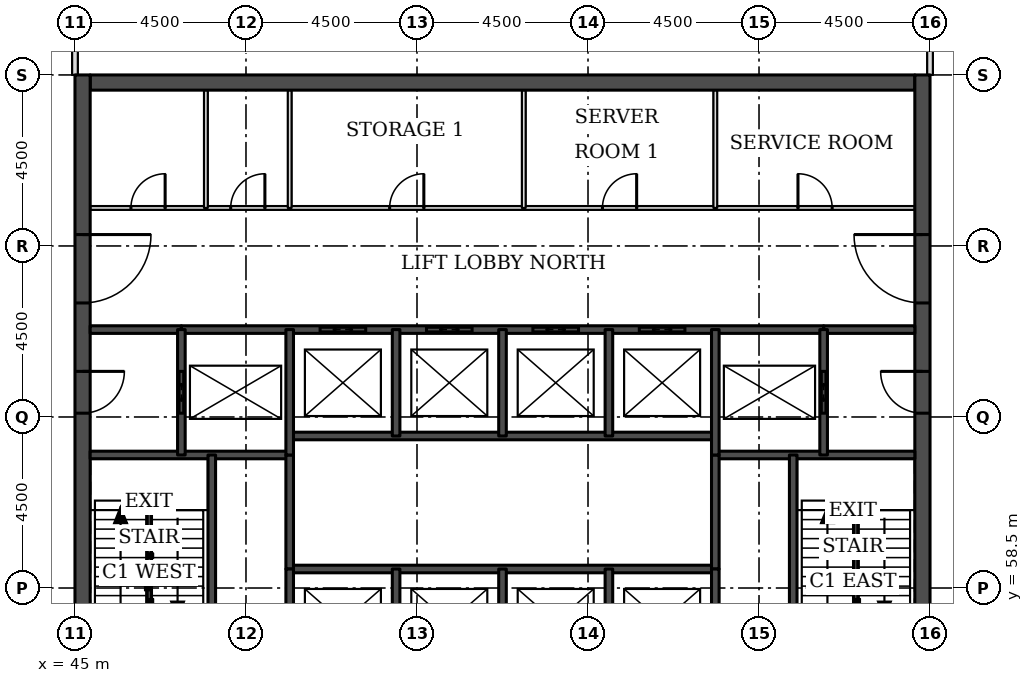
"""IFC4 building model, lengths in metres.
Left out: names, types, materials, properties, quantities, classifications, styles, units other than length and angle.
Written with IfcOpenShell. Run it as: python <this file> out.ifc"""

import sys

from ifc_helpers import new_model, si_unit, direction, frame, frame_2d, origin, place, context, subcontext, project, spatial, rectangle, extrude, element, fill, save


model = new_model("IFC4")
c1 = context("Model", 3, precision=1e-05, world=origin(), true_north=direction((0.0, 1.0)))
c2 = subcontext(c1, "Body", "Model", "MODEL_VIEW")
j1 = project(units=[si_unit("LENGTHUNIT", "METRE"), si_unit("PLANEANGLEUNIT", "RADIAN")], contexts=[c1])
p1 = place(None, origin())
s1 = spatial("IfcSite", under=j1, at=p1, CompositionType="ELEMENT")
p2 = place(p1, origin())
s2 = spatial("IfcBuilding", under=s1, at=p2, CompositionType="ELEMENT")
p3 = place(p2, frame((0.0, 0.0, 147.7)))
s3 = spatial("IfcBuildingStorey", under=s2, at=p3, CompositionType="ELEMENT", Elevation=147.7)
p4 = place(p3, frame((45.4, 71.8, 0.0), z_axis=(0.0, 0.0, 1.0), x_axis=(1.0, 0.0, 0.0)))
e1 = element("IfcWall", 1, at=p4, inside=s3, PredefinedType="SHEAR", context=c2, shape_type="SweptSolid", body=[
    extrude(rectangle(XDim=21.7, YDim=0.4, at=frame_2d((10.85, 0.0))), origin(), (0.0, 0.0, 1.0), 3.7),
])
p5 = place(p3, frame((45.2, 49.5, 0.0), z_axis=(0.0, 0.0, 1.0), x_axis=(0.0, 1.0, 0.0)))
e2 = element("IfcWall", 2, at=p5, inside=s3, PredefinedType="SHEAR", context=c2, shape_type="SweptSolid", body=[
    extrude(rectangle(XDim=22.5, YDim=0.4, at=frame_2d((11.25, 0.0))), origin(), (0.0, 0.0, 1.0), 3.7),
])
p6 = place(p5, frame((4.2, 0.0, 0.0)))
e3 = element("IfcOpeningElement", 3, at=p6, cuts=e2, PredefinedType="OPENING", context=c2, shape_type="SweptSolid", body=[
    extrude(rectangle(XDim=1.8, YDim=2.1, at=frame_2d((0.9, 1.05))), frame((0.0, 0.21, 0.0), z_axis=(0.0, -1.0, 0.0), x_axis=(1.0, 0.0, 0.0)), (0.0, 0.0, 1.0), 0.42),
])
p7 = place(p5, frame((6.9, 0.0, 0.0)))
e4 = element("IfcOpeningElement", 4, at=p7, cuts=e2, PredefinedType="OPENING", context=c2, shape_type="SweptSolid", body=[
    extrude(rectangle(XDim=1.1, YDim=2.1, at=frame_2d((0.55, 1.05))), frame((0.0, 0.21, 0.0), z_axis=(0.0, -1.0, 0.0), x_axis=(1.0, 0.0, 0.0)), (0.0, 0.0, 1.0), 0.42),
])
p8 = place(p5, frame((13.6, 0.0, 0.0)))
e5 = element("IfcOpeningElement", 5, at=p8, cuts=e2, PredefinedType="OPENING", context=c2, shape_type="SweptSolid", body=[
    extrude(rectangle(XDim=1.1, YDim=2.1, at=frame_2d((0.55, 1.05))), frame((0.0, 0.21, 0.0), z_axis=(0.0, -1.0, 0.0), x_axis=(1.0, 0.0, 0.0)), (0.0, 0.0, 1.0), 0.42),
])
p9 = place(p5, frame((16.5, 0.0, 0.0)))
e6 = element("IfcOpeningElement", 6, at=p9, cuts=e2, PredefinedType="OPENING", context=c2, shape_type="SweptSolid", body=[
    extrude(rectangle(XDim=1.8, YDim=2.1, at=frame_2d((0.9, 1.05))), frame((0.0, 0.21, 0.0), z_axis=(0.0, -1.0, 0.0), x_axis=(1.0, 0.0, 0.0)), (0.0, 0.0, 1.0), 0.42),
])
p10 = place(p3, frame((67.3, 49.5, 0.0), z_axis=(0.0, 0.0, 1.0), x_axis=(0.0, 1.0, 0.0)))
e7 = element("IfcWall", 7, at=p10, inside=s3, PredefinedType="SHEAR", context=c2, shape_type="SweptSolid", body=[
    extrude(rectangle(XDim=22.5, YDim=0.4, at=frame_2d((11.25, 0.0))), origin(), (0.0, 0.0, 1.0), 3.7),
])
p11 = place(p10, frame((4.2, 0.0, 0.0)))
e8 = element("IfcOpeningElement", 8, at=p11, cuts=e7, PredefinedType="OPENING", context=c2, shape_type="SweptSolid", body=[
    extrude(rectangle(XDim=1.8, YDim=2.1, at=frame_2d((0.9, 1.05))), frame((0.0, 0.21, 0.0), z_axis=(0.0, -1.0, 0.0), x_axis=(1.0, 0.0, 0.0)), (0.0, 0.0, 1.0), 0.42),
])
p12 = place(p10, frame((6.9, 0.0, 0.0)))
e9 = element("IfcOpeningElement", 9, at=p12, cuts=e7, PredefinedType="OPENING", context=c2, shape_type="SweptSolid", body=[
    extrude(rectangle(XDim=1.1, YDim=2.1, at=frame_2d((0.55, 1.05))), frame((0.0, 0.21, 0.0), z_axis=(0.0, -1.0, 0.0), x_axis=(1.0, 0.0, 0.0)), (0.0, 0.0, 1.0), 0.42),
])
p13 = place(p10, frame((13.6, 0.0, 0.0)))
e10 = element("IfcOpeningElement", 10, at=p13, cuts=e7, PredefinedType="OPENING", context=c2, shape_type="SweptSolid", body=[
    extrude(rectangle(XDim=1.1, YDim=2.1, at=frame_2d((0.55, 1.05))), frame((0.0, 0.21, 0.0), z_axis=(0.0, -1.0, 0.0), x_axis=(1.0, 0.0, 0.0)), (0.0, 0.0, 1.0), 0.42),
])
p14 = place(p10, frame((16.5, 0.0, 0.0)))
e11 = element("IfcOpeningElement", 11, at=p14, cuts=e7, PredefinedType="OPENING", context=c2, shape_type="SweptSolid", body=[
    extrude(rectangle(XDim=1.8, YDim=2.1, at=frame_2d((0.9, 1.05))), frame((0.0, 0.21, 0.0), z_axis=(0.0, -1.0, 0.0), x_axis=(1.0, 0.0, 0.0)), (0.0, 0.0, 1.0), 0.42),
])
for number, where, z_axis, x_axis in (
    (12, (45.0, 72.0, 0.0), (0.0, 0.0, 1.0), (0.0, 1.0, 0.0)),
    (13, (67.5, 72.0, 0.0), (0.0, 0.0, 1.0), (0.0, 1.0, 0.0)),
):
    element("IfcWall", number, at=place(p3, frame(where, z_axis=z_axis, x_axis=x_axis)), inside=s3, PredefinedType="PARTITIONING", context=c2, shape_type="SweptSolid", body=[
        extrude(rectangle(XDim=3.0, YDim=0.15, at=frame_2d((1.5, 0.0))), origin(), (0.0, 0.0, 1.0), 3.022),
    ])
p15 = place(p3, frame((50.65, 59.0, 0.0), z_axis=(0.0, 0.0, 1.0), x_axis=(1.0, 0.0, 0.0)))
e14 = element("IfcWall", 14, at=p15, inside=s3, PredefinedType="SOLIDWALL", context=c2, shape_type="SweptSolid", body=[
    extrude(rectangle(XDim=11.2, YDim=0.2, at=frame_2d((5.6, 0.0))), origin(), (0.0, 0.0, 1.0), 3.7),
])
for number, where, z_axis, x_axis in (
    (15, (45.4, 62.0, 0.0), (0.0, 0.0, 1.0), (1.0, 0.0, 0.0)),
    (16, (61.85, 62.0, 0.0), (0.0, 0.0, 1.0), (1.0, 0.0, 0.0)),
):
    element("IfcWall", number, at=place(p3, frame(where, z_axis=z_axis, x_axis=x_axis)), inside=s3, PredefinedType="SOLIDWALL", context=c2, shape_type="SweptSolid", body=[
        extrude(rectangle(XDim=5.25, YDim=0.2, at=frame_2d((2.625, 0.0))), origin(), (0.0, 0.0, 1.0), 3.55),
    ])
p16 = place(p3, frame((50.65, 62.5, 0.0), z_axis=(0.0, 0.0, 1.0), x_axis=(1.0, 0.0, 0.0)))
e17 = element("IfcWall", 17, at=p16, inside=s3, PredefinedType="SOLIDWALL", context=c2, shape_type="SweptSolid", body=[
    extrude(rectangle(XDim=11.2, YDim=0.2, at=frame_2d((5.6, 0.0))), origin(), (0.0, 0.0, 1.0), 3.7),
])
for number, where, z_axis, x_axis in (
    (18, (45.4, 65.3, 0.0), (0.0, 0.0, 1.0), (1.0, 0.0, 0.0)),
    (19, (64.7, 65.3, 0.0), (0.0, 0.0, 1.0), (1.0, 0.0, 0.0)),
):
    element("IfcWall", number, at=place(p3, frame(where, z_axis=z_axis, x_axis=x_axis)), inside=s3, PredefinedType="SOLIDWALL", context=c2, shape_type="SweptSolid", body=[
        extrude(rectangle(XDim=2.4, YDim=0.2, at=frame_2d((1.2, 0.0))), origin(), (0.0, 0.0, 1.0), 3.55),
    ])
p17 = place(p3, frame((47.8, 65.3, 0.0), z_axis=(0.0, 0.0, 1.0), x_axis=(1.0, 0.0, 0.0)))
e20 = element("IfcWall", 20, at=p17, inside=s3, PredefinedType="SOLIDWALL", context=c2, shape_type="SweptSolid", body=[
    extrude(rectangle(XDim=16.9, YDim=0.2, at=frame_2d((8.45, 0.0))), origin(), (0.0, 0.0, 1.0), 3.55),
])
p18 = place(p17, frame((3.65, 0.0, 0.0)))
e21 = element("IfcOpeningElement", 21, at=p18, cuts=e20, PredefinedType="OPENING", context=c2, shape_type="SweptSolid", body=[
    extrude(rectangle(XDim=1.2, YDim=2.1, at=frame_2d((0.6, 1.05))), frame((0.0, 0.11, 0.0), z_axis=(0.0, -1.0, 0.0), x_axis=(1.0, 0.0, 0.0)), (0.0, 0.0, 1.0), 0.22),
])
p19 = place(p17, frame((6.45, 0.0, 0.0)))
e22 = element("IfcOpeningElement", 22, at=p19, cuts=e20, PredefinedType="OPENING", context=c2, shape_type="SweptSolid", body=[
    extrude(rectangle(XDim=1.2, YDim=2.1, at=frame_2d((0.6, 1.05))), frame((0.0, 0.11, 0.0), z_axis=(0.0, -1.0, 0.0), x_axis=(1.0, 0.0, 0.0)), (0.0, 0.0, 1.0), 0.22),
])
p20 = place(p17, frame((9.25, 0.0, 0.0)))
e23 = element("IfcOpeningElement", 23, at=p20, cuts=e20, PredefinedType="OPENING", context=c2, shape_type="SweptSolid", body=[
    extrude(rectangle(XDim=1.2, YDim=2.1, at=frame_2d((0.6, 1.05))), frame((0.0, 0.11, 0.0), z_axis=(0.0, -1.0, 0.0), x_axis=(1.0, 0.0, 0.0)), (0.0, 0.0, 1.0), 0.22),
])
p21 = place(p17, frame((12.05, 0.0, 0.0)))
e24 = element("IfcOpeningElement", 24, at=p21, cuts=e20, PredefinedType="OPENING", context=c2, shape_type="SweptSolid", body=[
    extrude(rectangle(XDim=1.2, YDim=2.1, at=frame_2d((0.6, 1.05))), frame((0.0, 0.11, 0.0), z_axis=(0.0, -1.0, 0.0), x_axis=(1.0, 0.0, 0.0)), (0.0, 0.0, 1.0), 0.22),
])
p22 = place(p3, frame((45.4, 68.5, 0.0), z_axis=(0.0, 0.0, 1.0), x_axis=(1.0, 0.0, 0.0)))
e25 = element("IfcWall", 25, at=p22, inside=s3, PredefinedType="PARTITIONING", context=c2, shape_type="SweptSolid", body=[
    extrude(rectangle(XDim=21.7, YDim=0.1, at=frame_2d((10.85, 0.0))), origin(), (0.0, 0.0, 1.0), 3.55),
])
p23 = place(p22, frame((18.625, 0.0, 0.0)))
e26 = element("IfcOpeningElement", 26, at=p23, cuts=e25, PredefinedType="OPENING", context=c2, shape_type="SweptSolid", body=[
    extrude(rectangle(XDim=0.9, YDim=2.1, at=frame_2d((0.45, 1.05))), frame((0.0, 0.06, 0.0), z_axis=(0.0, -1.0, 0.0), x_axis=(1.0, 0.0, 0.0)), (0.0, 0.0, 1.0), 0.12),
])
p24 = place(p22, frame((1.073, 0.0, 0.0)))
e27 = element("IfcOpeningElement", 27, at=p24, cuts=e25, PredefinedType="OPENING", context=c2, shape_type="SweptSolid", body=[
    extrude(rectangle(XDim=0.9, YDim=2.1, at=frame_2d((0.45, 1.05))), frame((0.0, 0.06, 0.0), z_axis=(0.0, -1.0, 0.0), x_axis=(1.0, 0.0, 0.0)), (0.0, 0.0, 1.0), 0.12),
])
p25 = place(p22, frame((3.698, 0.0, 0.0)))
e28 = element("IfcOpeningElement", 28, at=p25, cuts=e25, PredefinedType="OPENING", context=c2, shape_type="SweptSolid", body=[
    extrude(rectangle(XDim=0.9, YDim=2.1, at=frame_2d((0.45, 1.05))), frame((0.0, 0.06, 0.0), z_axis=(0.0, -1.0, 0.0), x_axis=(1.0, 0.0, 0.0)), (0.0, 0.0, 1.0), 0.12),
])
p26 = place(p22, frame((13.48, 0.0, 0.0)))
e29 = element("IfcOpeningElement", 29, at=p26, cuts=e25, PredefinedType="OPENING", context=c2, shape_type="SweptSolid", body=[
    extrude(rectangle(XDim=0.9, YDim=2.1, at=frame_2d((0.45, 1.05))), frame((0.0, 0.06, 0.0), z_axis=(0.0, -1.0, 0.0), x_axis=(1.0, 0.0, 0.0)), (0.0, 0.0, 1.0), 0.12),
])
p27 = place(p22, frame((7.88, 0.0, 0.0)))
e30 = element("IfcOpeningElement", 30, at=p27, cuts=e25, PredefinedType="OPENING", context=c2, shape_type="SweptSolid", body=[
    extrude(rectangle(XDim=0.9, YDim=2.1, at=frame_2d((0.45, 1.05))), frame((0.0, 0.06, 0.0), z_axis=(0.0, -1.0, 0.0), x_axis=(1.0, 0.0, 0.0)), (0.0, 0.0, 1.0), 0.12),
])
p28 = place(p3, frame((47.8, 62.0, 0.0), z_axis=(0.0, 0.0, 1.0), x_axis=(0.0, 1.0, 0.0)))
e31 = element("IfcWall", 31, at=p28, inside=s3, PredefinedType="SOLIDWALL", context=c2, shape_type="SweptSolid", body=[
    extrude(rectangle(XDim=3.3, YDim=0.2, at=frame_2d((1.65, 0.0))), origin(), (0.0, 0.0, 1.0), 3.55),
])
p29 = place(p28, frame((1.1, 0.0, 0.0)))
e32 = element("IfcOpeningElement", 32, at=p29, cuts=e31, PredefinedType="OPENING", context=c2, shape_type="SweptSolid", body=[
    extrude(rectangle(XDim=1.1, YDim=2.1, at=frame_2d((0.55, 1.05))), frame((0.0, 0.11, 0.0), z_axis=(0.0, -1.0, 0.0), x_axis=(1.0, 0.0, 0.0)), (0.0, 0.0, 1.0), 0.22),
])
p30 = place(p3, frame((48.445, 68.5, 0.0), z_axis=(0.0, 0.0, 1.0), x_axis=(0.0, 1.0, 0.0)))
e33 = element("IfcWall", 33, at=p30, inside=s3, PredefinedType="PARTITIONING", context=c2, shape_type="SweptSolid", body=[
    extrude(rectangle(XDim=3.1, YDim=0.1, at=frame_2d((1.55, 0.0))), origin(), (0.0, 0.0, 1.0), 3.55),
])
p31 = place(p3, frame((48.6, 56.2, 0.0), z_axis=(0.0, 0.0, 1.0), x_axis=(0.0, 1.0, 0.0)))
e34 = element("IfcWall", 34, at=p31, inside=s3, PredefinedType="SOLIDWALL", context=c2, shape_type="SweptSolid", body=[
    extrude(rectangle(XDim=5.8, YDim=0.2, at=frame_2d((2.9, 0.0))), origin(), (0.0, 0.0, 1.0), 3.55),
])
p32 = place(p3, frame((50.65, 68.5, 0.0), z_axis=(0.0, 0.0, 1.0), x_axis=(0.0, 1.0, 0.0)))
e35 = element("IfcWall", 35, at=p32, inside=s3, PredefinedType="PARTITIONING", context=c2, shape_type="SweptSolid", body=[
    extrude(rectangle(XDim=3.1, YDim=0.1, at=frame_2d((1.55, 0.0))), origin(), (0.0, 0.0, 1.0), 3.55),
])
p33 = place(p3, frame((50.65, 59.0, 0.0), z_axis=(0.0, 0.0, 1.0), x_axis=(0.0, 1.0, 0.0)))
e36 = element("IfcWall", 36, at=p33, inside=s3, PredefinedType="SOLIDWALL", context=c2, shape_type="SweptSolid", body=[
    extrude(rectangle(XDim=3.0, YDim=0.2, at=frame_2d((1.5, 0.0))), origin(), (0.0, 0.0, 1.0), 3.7),
])
p34 = place(p3, frame((50.65, 56.2, 0.0), z_axis=(0.0, 0.0, 1.0), x_axis=(0.0, 1.0, 0.0)))
e37 = element("IfcWall", 37, at=p34, inside=s3, PredefinedType="SOLIDWALL", context=c2, shape_type="SweptSolid", body=[
    extrude(rectangle(XDim=2.8, YDim=0.2, at=frame_2d((1.4, 0.0))), origin(), (0.0, 0.0, 1.0), 3.55),
])
p35 = place(p3, frame((50.65, 62.0, 0.0), z_axis=(0.0, 0.0, 1.0), x_axis=(0.0, 1.0, 0.0)))
e38 = element("IfcWall", 38, at=p35, inside=s3, PredefinedType="SOLIDWALL", context=c2, shape_type="SweptSolid", body=[
    extrude(rectangle(XDim=3.3, YDim=0.2, at=frame_2d((1.65, 0.0))), origin(), (0.0, 0.0, 1.0), 3.55),
])
for number, where, z_axis, x_axis in (
    (39, (53.45, 56.2, 0.0), (0.0, 0.0, 1.0), (0.0, 1.0, 0.0)),
    (40, (53.45, 62.5, 0.0), (0.0, 0.0, 1.0), (0.0, 1.0, 0.0)),
    (41, (56.25, 56.2, 0.0), (0.0, 0.0, 1.0), (0.0, 1.0, 0.0)),
    (42, (56.25, 62.5, 0.0), (0.0, 0.0, 1.0), (0.0, 1.0, 0.0)),
):
    element("IfcWall", number, at=place(p3, frame(where, z_axis=z_axis, x_axis=x_axis)), inside=s3, PredefinedType="SOLIDWALL", context=c2, shape_type="SweptSolid", body=[
        extrude(rectangle(XDim=2.8, YDim=0.2, at=frame_2d((1.4, 0.0))), origin(), (0.0, 0.0, 1.0), 3.55),
    ])
p36 = place(p3, frame((56.81, 68.5, 0.0), z_axis=(0.0, 0.0, 1.0), x_axis=(0.0, 1.0, 0.0)))
e43 = element("IfcWall", 43, at=p36, inside=s3, PredefinedType="PARTITIONING", context=c2, shape_type="SweptSolid", body=[
    extrude(rectangle(XDim=3.1, YDim=0.1, at=frame_2d((1.55, 0.0))), origin(), (0.0, 0.0, 1.0), 3.55),
])
for number, where, z_axis, x_axis in (
    (44, (59.05, 56.2, 0.0), (0.0, 0.0, 1.0), (0.0, 1.0, 0.0)),
    (45, (59.05, 62.5, 0.0), (0.0, 0.0, 1.0), (0.0, 1.0, 0.0)),
):
    element("IfcWall", number, at=place(p3, frame(where, z_axis=z_axis, x_axis=x_axis)), inside=s3, PredefinedType="SOLIDWALL", context=c2, shape_type="SweptSolid", body=[
        extrude(rectangle(XDim=2.8, YDim=0.2, at=frame_2d((1.4, 0.0))), origin(), (0.0, 0.0, 1.0), 3.55),
    ])
p37 = place(p3, frame((61.85, 68.5, 0.0), z_axis=(0.0, 0.0, 1.0), x_axis=(0.0, 1.0, 0.0)))
e46 = element("IfcWall", 46, at=p37, inside=s3, PredefinedType="PARTITIONING", context=c2, shape_type="SweptSolid", body=[
    extrude(rectangle(XDim=3.1, YDim=0.1, at=frame_2d((1.55, 0.0))), origin(), (0.0, 0.0, 1.0), 3.55),
])
p38 = place(p3, frame((61.85, 59.0, 0.0), z_axis=(0.0, 0.0, 1.0), x_axis=(0.0, 1.0, 0.0)))
e47 = element("IfcWall", 47, at=p38, inside=s3, PredefinedType="SOLIDWALL", context=c2, shape_type="SweptSolid", body=[
    extrude(rectangle(XDim=3.0, YDim=0.2, at=frame_2d((1.5, 0.0))), origin(), (0.0, 0.0, 1.0), 3.7),
])
p39 = place(p3, frame((61.85, 56.2, 0.0), z_axis=(0.0, 0.0, 1.0), x_axis=(0.0, 1.0, 0.0)))
e48 = element("IfcWall", 48, at=p39, inside=s3, PredefinedType="SOLIDWALL", context=c2, shape_type="SweptSolid", body=[
    extrude(rectangle(XDim=2.8, YDim=0.2, at=frame_2d((1.4, 0.0))), origin(), (0.0, 0.0, 1.0), 3.55),
])
p40 = place(p3, frame((61.85, 62.0, 0.0), z_axis=(0.0, 0.0, 1.0), x_axis=(0.0, 1.0, 0.0)))
e49 = element("IfcWall", 49, at=p40, inside=s3, PredefinedType="SOLIDWALL", context=c2, shape_type="SweptSolid", body=[
    extrude(rectangle(XDim=3.3, YDim=0.2, at=frame_2d((1.65, 0.0))), origin(), (0.0, 0.0, 1.0), 3.55),
])
p41 = place(p3, frame((63.9, 56.2, 0.0), z_axis=(0.0, 0.0, 1.0), x_axis=(0.0, 1.0, 0.0)))
e50 = element("IfcWall", 50, at=p41, inside=s3, PredefinedType="SOLIDWALL", context=c2, shape_type="SweptSolid", body=[
    extrude(rectangle(XDim=5.8, YDim=0.2, at=frame_2d((2.9, 0.0))), origin(), (0.0, 0.0, 1.0), 3.55),
])
p42 = place(p3, frame((64.7, 62.0, 0.0), z_axis=(0.0, 0.0, 1.0), x_axis=(0.0, 1.0, 0.0)))
e51 = element("IfcWall", 51, at=p42, inside=s3, PredefinedType="SOLIDWALL", context=c2, shape_type="SweptSolid", body=[
    extrude(rectangle(XDim=3.3, YDim=0.2, at=frame_2d((1.65, 0.0))), origin(), (0.0, 0.0, 1.0), 3.55),
])
p43 = place(p42, frame((1.1, 0.0, 0.0)))
e52 = element("IfcOpeningElement", 52, at=p43, cuts=e51, PredefinedType="OPENING", context=c2, shape_type="SweptSolid", body=[
    extrude(rectangle(XDim=1.1, YDim=2.1, at=frame_2d((0.55, 1.05))), frame((0.0, 0.11, 0.0), z_axis=(0.0, -1.0, 0.0), x_axis=(1.0, 0.0, 0.0)), (0.0, 0.0, 1.0), 0.22),
])
p44 = place(p18, origin())
e53 = element("IfcDoor", 53, at=p44, inside=s3, OperationType="DOUBLE_DOOR_SLIDING", PredefinedType="DOOR", context=c2, shape_type="SweptSolid", body=[
    extrude(rectangle(XDim=1.2, YDim=2.1, at=frame_2d((0.6, 1.05))), frame((0.0, 0.025, 0.0), z_axis=(0.0, -1.0, 0.0), x_axis=(1.0, 0.0, 0.0)), (0.0, 0.0, 1.0), 0.05),
])
fill(e21, e53)
p45 = place(p19, origin())
e54 = element("IfcDoor", 54, at=p45, inside=s3, OperationType="DOUBLE_DOOR_SLIDING", PredefinedType="DOOR", context=c2, shape_type="SweptSolid", body=[
    extrude(rectangle(XDim=1.2, YDim=2.1, at=frame_2d((0.6, 1.05))), frame((0.0, 0.025, 0.0), z_axis=(0.0, -1.0, 0.0), x_axis=(1.0, 0.0, 0.0)), (0.0, 0.0, 1.0), 0.05),
])
fill(e22, e54)
p46 = place(p20, origin())
e55 = element("IfcDoor", 55, at=p46, inside=s3, OperationType="DOUBLE_DOOR_SLIDING", PredefinedType="DOOR", context=c2, shape_type="SweptSolid", body=[
    extrude(rectangle(XDim=1.2, YDim=2.1, at=frame_2d((0.6, 1.05))), frame((0.0, 0.025, 0.0), z_axis=(0.0, -1.0, 0.0), x_axis=(1.0, 0.0, 0.0)), (0.0, 0.0, 1.0), 0.05),
])
fill(e23, e55)
p47 = place(p21, origin())
e56 = element("IfcDoor", 56, at=p47, inside=s3, OperationType="DOUBLE_DOOR_SLIDING", PredefinedType="DOOR", context=c2, shape_type="SweptSolid", body=[
    extrude(rectangle(XDim=1.2, YDim=2.1, at=frame_2d((0.6, 1.05))), frame((0.0, 0.025, 0.0), z_axis=(0.0, -1.0, 0.0), x_axis=(1.0, 0.0, 0.0)), (0.0, 0.0, 1.0), 0.05),
])
fill(e24, e56)
p48 = place(p29, origin())
e57 = element("IfcDoor", 57, at=p48, inside=s3, OperationType="DOUBLE_DOOR_SLIDING", PredefinedType="DOOR", context=c2, shape_type="SweptSolid", body=[
    extrude(rectangle(XDim=1.1, YDim=2.1, at=frame_2d((0.55, 1.05))), frame((0.0, 0.025, 0.0), z_axis=(0.0, -1.0, 0.0), x_axis=(1.0, 0.0, 0.0)), (0.0, 0.0, 1.0), 0.05),
])
fill(e32, e57)
p49 = place(p43, origin())
e58 = element("IfcDoor", 58, at=p49, inside=s3, OperationType="DOUBLE_DOOR_SLIDING", PredefinedType="DOOR", context=c2, shape_type="SweptSolid", body=[
    extrude(rectangle(XDim=1.1, YDim=2.1, at=frame_2d((0.55, 1.05))), frame((0.0, 0.025, 0.0), z_axis=(0.0, -1.0, 0.0), x_axis=(1.0, 0.0, 0.0)), (0.0, 0.0, 1.0), 0.05),
])
fill(e52, e58)
p50 = place(p8, frame((1.1, 0.0, 0.0), z_axis=(0.0, 0.0, 1.0), x_axis=(-1.0, 0.0, 0.0)))
e59 = element("IfcDoor", 59, at=p50, inside=s3, OperationType="SINGLE_SWING_LEFT", PredefinedType="DOOR", context=c2, shape_type="SweptSolid", body=[
    extrude(rectangle(XDim=1.1, YDim=2.1, at=frame_2d((0.55, 1.05))), frame((0.0, 0.025, 0.0), z_axis=(0.0, -1.0, 0.0), x_axis=(1.0, 0.0, 0.0)), (0.0, 0.0, 1.0), 0.05),
])
fill(e5, e59)
p51 = place(p9, frame((1.8, 0.0, 0.0), z_axis=(0.0, 0.0, 1.0), x_axis=(-1.0, 0.0, 0.0)))
e60 = element("IfcDoor", 60, at=p51, inside=s3, OperationType="SINGLE_SWING_LEFT", PredefinedType="DOOR", context=c2, shape_type="SweptSolid", body=[
    extrude(rectangle(XDim=1.8, YDim=2.1, at=frame_2d((0.9, 1.05))), frame((0.0, 0.025, 0.0), z_axis=(0.0, -1.0, 0.0), x_axis=(1.0, 0.0, 0.0)), (0.0, 0.0, 1.0), 0.05),
])
fill(e6, e60)
p52 = place(p13, origin())
e61 = element("IfcDoor", 61, at=p52, inside=s3, OperationType="SINGLE_SWING_RIGHT", PredefinedType="DOOR", context=c2, shape_type="SweptSolid", body=[
    extrude(rectangle(XDim=1.1, YDim=2.1, at=frame_2d((0.55, 1.05))), frame((0.0, 0.025, 0.0), z_axis=(0.0, -1.0, 0.0), x_axis=(1.0, 0.0, 0.0)), (0.0, 0.0, 1.0), 0.05),
])
fill(e10, e61)
p53 = place(p14, origin())
e62 = element("IfcDoor", 62, at=p53, inside=s3, OperationType="SINGLE_SWING_RIGHT", PredefinedType="DOOR", context=c2, shape_type="SweptSolid", body=[
    extrude(rectangle(XDim=1.8, YDim=2.1, at=frame_2d((0.9, 1.05))), frame((0.0, 0.025, 0.0), z_axis=(0.0, -1.0, 0.0), x_axis=(1.0, 0.0, 0.0)), (0.0, 0.0, 1.0), 0.05),
])
fill(e11, e62)
p54 = place(p23, origin())
e63 = element("IfcDoor", 63, at=p54, inside=s3, OperationType="SINGLE_SWING_LEFT", PredefinedType="DOOR", context=c2, shape_type="SweptSolid", body=[
    extrude(rectangle(XDim=0.9, YDim=2.1, at=frame_2d((0.45, 1.05))), frame((0.0, 0.025, 0.0), z_axis=(0.0, -1.0, 0.0), x_axis=(1.0, 0.0, 0.0)), (0.0, 0.0, 1.0), 0.05),
])
fill(e26, e63)
p55 = place(p24, origin())
e64 = element("IfcDoor", 64, at=p55, inside=s3, OperationType="SINGLE_SWING_RIGHT", PredefinedType="DOOR", context=c2, shape_type="SweptSolid", body=[
    extrude(rectangle(XDim=0.9, YDim=2.1, at=frame_2d((0.45, 1.05))), frame((0.0, 0.025, 0.0), z_axis=(0.0, -1.0, 0.0), x_axis=(1.0, 0.0, 0.0)), (0.0, 0.0, 1.0), 0.05),
])
fill(e27, e64)
p56 = place(p25, origin())
e65 = element("IfcDoor", 65, at=p56, inside=s3, OperationType="SINGLE_SWING_RIGHT", PredefinedType="DOOR", context=c2, shape_type="SweptSolid", body=[
    extrude(rectangle(XDim=0.9, YDim=2.1, at=frame_2d((0.45, 1.05))), frame((0.0, 0.025, 0.0), z_axis=(0.0, -1.0, 0.0), x_axis=(1.0, 0.0, 0.0)), (0.0, 0.0, 1.0), 0.05),
])
fill(e28, e65)
p57 = place(p26, origin())
e66 = element("IfcDoor", 66, at=p57, inside=s3, OperationType="SINGLE_SWING_RIGHT", PredefinedType="DOOR", context=c2, shape_type="SweptSolid", body=[
    extrude(rectangle(XDim=0.9, YDim=2.1, at=frame_2d((0.45, 1.05))), frame((0.0, 0.025, 0.0), z_axis=(0.0, -1.0, 0.0), x_axis=(1.0, 0.0, 0.0)), (0.0, 0.0, 1.0), 0.05),
])
fill(e29, e66)
p58 = place(p27, origin())
e67 = element("IfcDoor", 67, at=p58, inside=s3, OperationType="SINGLE_SWING_RIGHT", PredefinedType="DOOR", context=c2, shape_type="SweptSolid", body=[
    extrude(rectangle(XDim=0.9, YDim=2.1, at=frame_2d((0.45, 1.05))), frame((0.0, 0.025, 0.0), z_axis=(0.0, -1.0, 0.0), x_axis=(1.0, 0.0, 0.0)), (0.0, 0.0, 1.0), 0.05),
])
fill(e30, e67)
save(model, sys.argv[1])
